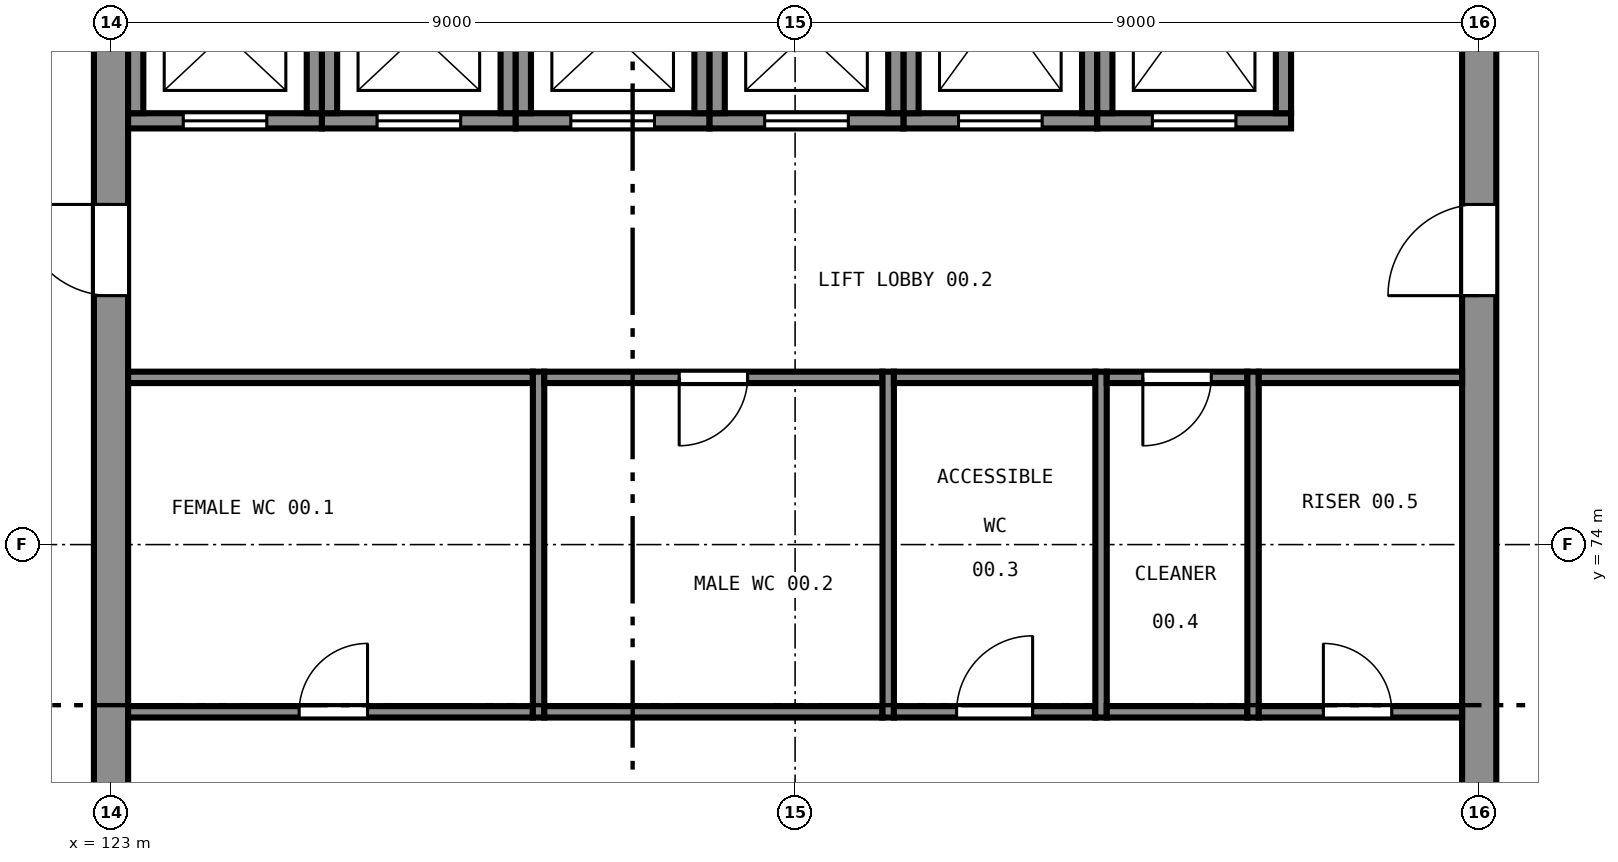
"""IFC4 building model, lengths in metres.
Left out: names, types, materials, properties, quantities, classifications, styles, units other than length and angle.
Written with IfcOpenShell. Run it as: python <this file> out.ifc"""

import sys

from ifc_helpers import new_model, si_unit, direction, frame, frame_2d, origin, place, context, subcontext, project, spatial, rectangle, extrude, element, fill, save


model = new_model("IFC4")
c1 = context("Model", 3, precision=1e-05, world=origin(), true_north=direction((0.0, 1.0)))
c2 = subcontext(c1, "Body", "Model", "MODEL_VIEW")
j1 = project(units=[si_unit("LENGTHUNIT", "METRE"), si_unit("PLANEANGLEUNIT", "RADIAN")], contexts=[c1])
p1 = place(None, origin())
s1 = spatial("IfcSite", under=j1, at=p1, CompositionType="ELEMENT")
p2 = place(p1, origin())
s2 = spatial("IfcBuilding", under=s1, at=p2, CompositionType="ELEMENT")
p3 = place(p2, origin())
s3 = spatial("IfcBuildingStorey", under=s2, at=p3, CompositionType="ELEMENT", Elevation=0.0)
p4 = place(p3, frame((141.0, 65.225, 0.0), z_axis=(0.0, 0.0, 1.0), x_axis=(0.0, 1.0, 0.0)))
e1 = element("IfcWall", 1, at=p4, inside=s3, PredefinedType="SHEAR", context=c2, shape_type="SweptSolid", body=[
    extrude(rectangle(XDim=17.55, YDim=0.45, at=frame_2d((8.775, 0.0))), origin(), (0.0, 0.0, 1.0), 5.5),
])
p5 = place(p4, frame((4.3, 0.0, 0.0)))
e2 = element("IfcOpeningElement", 2, at=p5, cuts=e1, PredefinedType="OPENING", context=c2, shape_type="SweptSolid", body=[
    extrude(rectangle(XDim=1.2, YDim=2.1, at=frame_2d((0.6, 1.05))), frame((0.0, 0.235, 0.0), z_axis=(0.0, -1.0, 0.0), x_axis=(1.0, 0.0, 0.0)), (0.0, 0.0, 1.0), 0.47),
])
p6 = place(p4, frame((12.05, 0.0, 0.0)))
e3 = element("IfcOpeningElement", 3, at=p6, cuts=e1, PredefinedType="OPENING", context=c2, shape_type="SweptSolid", body=[
    extrude(rectangle(XDim=1.2, YDim=2.1, at=frame_2d((0.6, 1.05))), frame((0.0, 0.235, 0.0), z_axis=(0.0, -1.0, 0.0), x_axis=(1.0, 0.0, 0.0)), (0.0, 0.0, 1.0), 0.47),
])
p7 = place(p3, frame((123.0, 82.775, 0.0), z_axis=(0.0, 0.0, 1.0), x_axis=(0.0, -1.0, 0.0)))
e4 = element("IfcWall", 4, at=p7, inside=s3, PredefinedType="SHEAR", context=c2, shape_type="SweptSolid", body=[
    extrude(rectangle(XDim=17.55, YDim=0.45, at=frame_2d((8.775, 0.0))), origin(), (0.0, 0.0, 1.0), 5.5),
])
p8 = place(p7, frame((12.05, 0.0, 0.0)))
e5 = element("IfcOpeningElement", 5, at=p8, cuts=e4, PredefinedType="OPENING", context=c2, shape_type="SweptSolid", body=[
    extrude(rectangle(XDim=1.2, YDim=2.1, at=frame_2d((0.6, 1.05))), frame((0.0, 0.235, 0.0), z_axis=(0.0, -1.0, 0.0), x_axis=(1.0, 0.0, 0.0)), (0.0, 0.0, 1.0), 0.47),
])
p9 = place(p7, frame((4.3, 0.0, 0.0)))
e6 = element("IfcOpeningElement", 6, at=p9, cuts=e4, PredefinedType="OPENING", context=c2, shape_type="SweptSolid", body=[
    extrude(rectangle(XDim=1.2, YDim=2.1, at=frame_2d((0.6, 1.05))), frame((0.0, 0.235, 0.0), z_axis=(0.0, -1.0, 0.0), x_axis=(1.0, 0.0, 0.0)), (0.0, 0.0, 1.0), 0.47),
])
p10 = place(p3, frame((123.225, 79.575, 0.0), z_axis=(0.0, 0.0, 1.0), x_axis=(1.0, 0.0, 0.0)))
e7 = element("IfcWall", 7, at=p10, inside=s3, PredefinedType="SHEAR", context=c2, shape_type="SweptSolid", body=[
    extrude(rectangle(XDim=2.55, YDim=0.2, at=frame_2d((1.275, 0.0))), origin(), (0.0, 0.0, 1.0), 5.5),
])
p11 = place(p10, frame((0.725, 0.0, 0.0)))
e8 = element("IfcOpeningElement", 8, at=p11, cuts=e7, PredefinedType="OPENING", context=c2, shape_type="SweptSolid", body=[
    extrude(rectangle(XDim=1.1, YDim=2.1, at=frame_2d((0.55, 1.05))), frame((0.0, 0.11, 0.0), z_axis=(0.0, -1.0, 0.0), x_axis=(1.0, 0.0, 0.0)), (0.0, 0.0, 1.0), 0.22),
])
for number, where, z_axis, x_axis in (
    (9, (125.675, 79.675, 0.0), (0.0, 0.0, 1.0), (0.0, 1.0, 0.0)),
    (10, (123.325, 81.775, 0.0), (0.0, 0.0, 1.0), (0.0, -1.0, 0.0)),
):
    element("IfcWall", number, at=place(p3, frame(where, z_axis=z_axis, x_axis=x_axis)), inside=s3, PredefinedType="SHEAR", context=c2, shape_type="SweptSolid", body=[
        extrude(rectangle(XDim=2.1, YDim=0.2, at=frame_2d((1.05, 0.0))), origin(), (0.0, 0.0, 1.0), 5.5),
    ])
p12 = place(p3, frame((125.775, 79.575, 0.0), z_axis=(0.0, 0.0, 1.0), x_axis=(1.0, 0.0, 0.0)))
e11 = element("IfcWall", 11, at=p12, inside=s3, PredefinedType="SHEAR", context=c2, shape_type="SweptSolid", body=[
    extrude(rectangle(XDim=2.55, YDim=0.2, at=frame_2d((1.275, 0.0))), origin(), (0.0, 0.0, 1.0), 5.5),
])
p13 = place(p12, frame((0.725, 0.0, 0.0)))
e12 = element("IfcOpeningElement", 12, at=p13, cuts=e11, PredefinedType="OPENING", context=c2, shape_type="SweptSolid", body=[
    extrude(rectangle(XDim=1.1, YDim=2.1, at=frame_2d((0.55, 1.05))), frame((0.0, 0.11, 0.0), z_axis=(0.0, -1.0, 0.0), x_axis=(1.0, 0.0, 0.0)), (0.0, 0.0, 1.0), 0.22),
])
for number, where, z_axis, x_axis in (
    (13, (128.225, 79.675, 0.0), (0.0, 0.0, 1.0), (0.0, 1.0, 0.0)),
    (14, (125.875, 81.775, 0.0), (0.0, 0.0, 1.0), (0.0, -1.0, 0.0)),
):
    element("IfcWall", number, at=place(p3, frame(where, z_axis=z_axis, x_axis=x_axis)), inside=s3, PredefinedType="SHEAR", context=c2, shape_type="SweptSolid", body=[
        extrude(rectangle(XDim=2.1, YDim=0.2, at=frame_2d((1.05, 0.0))), origin(), (0.0, 0.0, 1.0), 5.5),
    ])
p14 = place(p3, frame((128.325, 79.575, 0.0), z_axis=(0.0, 0.0, 1.0), x_axis=(1.0, 0.0, 0.0)))
e15 = element("IfcWall", 15, at=p14, inside=s3, PredefinedType="SHEAR", context=c2, shape_type="SweptSolid", body=[
    extrude(rectangle(XDim=2.55, YDim=0.2, at=frame_2d((1.275, 0.0))), origin(), (0.0, 0.0, 1.0), 5.5),
])
p15 = place(p14, frame((0.725, 0.0, 0.0)))
e16 = element("IfcOpeningElement", 16, at=p15, cuts=e15, PredefinedType="OPENING", context=c2, shape_type="SweptSolid", body=[
    extrude(rectangle(XDim=1.1, YDim=2.1, at=frame_2d((0.55, 1.05))), frame((0.0, 0.11, 0.0), z_axis=(0.0, -1.0, 0.0), x_axis=(1.0, 0.0, 0.0)), (0.0, 0.0, 1.0), 0.22),
])
for number, where, z_axis, x_axis in (
    (17, (130.775, 79.675, 0.0), (0.0, 0.0, 1.0), (0.0, 1.0, 0.0)),
    (18, (128.425, 81.775, 0.0), (0.0, 0.0, 1.0), (0.0, -1.0, 0.0)),
):
    element("IfcWall", number, at=place(p3, frame(where, z_axis=z_axis, x_axis=x_axis)), inside=s3, PredefinedType="SHEAR", context=c2, shape_type="SweptSolid", body=[
        extrude(rectangle(XDim=2.1, YDim=0.2, at=frame_2d((1.05, 0.0))), origin(), (0.0, 0.0, 1.0), 5.5),
    ])
p16 = place(p3, frame((130.875, 79.575, 0.0), z_axis=(0.0, 0.0, 1.0), x_axis=(1.0, 0.0, 0.0)))
e19 = element("IfcWall", 19, at=p16, inside=s3, PredefinedType="SHEAR", context=c2, shape_type="SweptSolid", body=[
    extrude(rectangle(XDim=2.55, YDim=0.2, at=frame_2d((1.275, 0.0))), origin(), (0.0, 0.0, 1.0), 5.5),
])
p17 = place(p16, frame((0.725, 0.0, 0.0)))
e20 = element("IfcOpeningElement", 20, at=p17, cuts=e19, PredefinedType="OPENING", context=c2, shape_type="SweptSolid", body=[
    extrude(rectangle(XDim=1.1, YDim=2.1, at=frame_2d((0.55, 1.05))), frame((0.0, 0.11, 0.0), z_axis=(0.0, -1.0, 0.0), x_axis=(1.0, 0.0, 0.0)), (0.0, 0.0, 1.0), 0.22),
])
for number, where, z_axis, x_axis in (
    (21, (133.325, 79.675, 0.0), (0.0, 0.0, 1.0), (0.0, 1.0, 0.0)),
    (22, (130.975, 81.775, 0.0), (0.0, 0.0, 1.0), (0.0, -1.0, 0.0)),
):
    element("IfcWall", number, at=place(p3, frame(where, z_axis=z_axis, x_axis=x_axis)), inside=s3, PredefinedType="SHEAR", context=c2, shape_type="SweptSolid", body=[
        extrude(rectangle(XDim=2.1, YDim=0.2, at=frame_2d((1.05, 0.0))), origin(), (0.0, 0.0, 1.0), 5.5),
    ])
p18 = place(p3, frame((133.425, 79.575, 0.0), z_axis=(0.0, 0.0, 1.0), x_axis=(1.0, 0.0, 0.0)))
e23 = element("IfcWall", 23, at=p18, inside=s3, PredefinedType="SHEAR", context=c2, shape_type="SweptSolid", body=[
    extrude(rectangle(XDim=2.55, YDim=0.2, at=frame_2d((1.275, 0.0))), origin(), (0.0, 0.0, 1.0), 5.5),
])
p19 = place(p18, frame((0.725, 0.0, 0.0)))
e24 = element("IfcOpeningElement", 24, at=p19, cuts=e23, PredefinedType="OPENING", context=c2, shape_type="SweptSolid", body=[
    extrude(rectangle(XDim=1.1, YDim=2.1, at=frame_2d((0.55, 1.05))), frame((0.0, 0.11, 0.0), z_axis=(0.0, -1.0, 0.0), x_axis=(1.0, 0.0, 0.0)), (0.0, 0.0, 1.0), 0.22),
])
for number, where, z_axis, x_axis in (
    (25, (135.875, 79.675, 0.0), (0.0, 0.0, 1.0), (0.0, 1.0, 0.0)),
    (26, (133.525, 82.475, 0.0), (0.0, 0.0, 1.0), (0.0, -1.0, 0.0)),
):
    element("IfcWall", number, at=place(p3, frame(where, z_axis=z_axis, x_axis=x_axis)), inside=s3, PredefinedType="SHEAR", context=c2, shape_type="SweptSolid", body=[
        extrude(rectangle(XDim=2.8, YDim=0.2, at=frame_2d((1.4, 0.0))), origin(), (0.0, 0.0, 1.0), 5.5),
    ])
p20 = place(p3, frame((135.975, 79.575, 0.0), z_axis=(0.0, 0.0, 1.0), x_axis=(1.0, 0.0, 0.0)))
e27 = element("IfcWall", 27, at=p20, inside=s3, PredefinedType="SHEAR", context=c2, shape_type="SweptSolid", body=[
    extrude(rectangle(XDim=2.55, YDim=0.2, at=frame_2d((1.275, 0.0))), origin(), (0.0, 0.0, 1.0), 5.5),
])
p21 = place(p20, frame((0.725, 0.0, 0.0)))
e28 = element("IfcOpeningElement", 28, at=p21, cuts=e27, PredefinedType="OPENING", context=c2, shape_type="SweptSolid", body=[
    extrude(rectangle(XDim=1.1, YDim=2.1, at=frame_2d((0.55, 1.05))), frame((0.0, 0.11, 0.0), z_axis=(0.0, -1.0, 0.0), x_axis=(1.0, 0.0, 0.0)), (0.0, 0.0, 1.0), 0.22),
])
for number, where, z_axis, x_axis in (
    (29, (138.425, 79.675, 0.0), (0.0, 0.0, 1.0), (0.0, 1.0, 0.0)),
    (30, (136.075, 82.475, 0.0), (0.0, 0.0, 1.0), (0.0, -1.0, 0.0)),
):
    element("IfcWall", number, at=place(p3, frame(where, z_axis=z_axis, x_axis=x_axis)), inside=s3, PredefinedType="SHEAR", context=c2, shape_type="SweptSolid", body=[
        extrude(rectangle(XDim=2.8, YDim=0.2, at=frame_2d((1.4, 0.0))), origin(), (0.0, 0.0, 1.0), 5.5),
    ])
p22 = place(p3, frame((128.625, 71.725, 0.0), z_axis=(0.0, 0.0, 1.0), x_axis=(0.0, 1.0, 0.0)))
e31 = element("IfcWall", 31, at=p22, inside=s3, PredefinedType="PARTITIONING", context=c2, shape_type="SweptSolid", body=[
    extrude(rectangle(XDim=4.55, YDim=0.15, at=frame_2d((2.275, 0.0))), origin(), (0.0, 0.0, 1.0), 5.25),
])
p23 = place(p3, frame((123.225, 71.8, 0.0), z_axis=(0.0, 0.0, 1.0), x_axis=(1.0, 0.0, 0.0)))
e32 = element("IfcWall", 32, at=p23, inside=s3, PredefinedType="PARTITIONING", context=c2, shape_type="SweptSolid", body=[
    extrude(rectangle(XDim=5.325, YDim=0.15, at=frame_2d((2.663, 0.0))), origin(), (0.0, 0.0, 1.0), 5.25),
])
p24 = place(p23, frame((2.25, 0.0, 0.0)))
e33 = element("IfcOpeningElement", 33, at=p24, cuts=e32, PredefinedType="OPENING", context=c2, shape_type="SweptSolid", body=[
    extrude(rectangle(XDim=0.9, YDim=2.1, at=frame_2d((0.45, 1.05))), frame((0.0, 0.085, 0.0), z_axis=(0.0, -1.0, 0.0), x_axis=(1.0, 0.0, 0.0)), (0.0, 0.0, 1.0), 0.17),
])
p25 = place(p3, frame((123.225, 76.2, 0.0), z_axis=(0.0, 0.0, 1.0), x_axis=(1.0, 0.0, 0.0)))
e34 = element("IfcWall", 34, at=p25, inside=s3, PredefinedType="PARTITIONING", context=c2, shape_type="SweptSolid", body=[
    extrude(rectangle(XDim=5.325, YDim=0.15, at=frame_2d((2.663, 0.0))), origin(), (0.0, 0.0, 1.0), 5.25),
])
p26 = place(p3, frame((133.225, 71.725, 0.0), z_axis=(0.0, 0.0, 1.0), x_axis=(0.0, 1.0, 0.0)))
e35 = element("IfcWall", 35, at=p26, inside=s3, PredefinedType="PARTITIONING", context=c2, shape_type="SweptSolid", body=[
    extrude(rectangle(XDim=4.55, YDim=0.15, at=frame_2d((2.275, 0.0))), origin(), (0.0, 0.0, 1.0), 5.25),
])
p27 = place(p3, frame((128.7, 71.8, 0.0), z_axis=(0.0, 0.0, 1.0), x_axis=(1.0, 0.0, 0.0)))
e36 = element("IfcWall", 36, at=p27, inside=s3, PredefinedType="PARTITIONING", context=c2, shape_type="SweptSolid", body=[
    extrude(rectangle(XDim=4.45, YDim=0.15, at=frame_2d((2.225, 0.0))), origin(), (0.0, 0.0, 1.0), 5.25),
])
p28 = place(p3, frame((128.7, 76.2, 0.0), z_axis=(0.0, 0.0, 1.0), x_axis=(1.0, 0.0, 0.0)))
e37 = element("IfcWall", 37, at=p28, inside=s3, PredefinedType="PARTITIONING", context=c2, shape_type="SweptSolid", body=[
    extrude(rectangle(XDim=4.45, YDim=0.15, at=frame_2d((2.225, 0.0))), origin(), (0.0, 0.0, 1.0), 5.25),
])
p29 = place(p28, frame((1.775, 0.0, 0.0)))
e38 = element("IfcOpeningElement", 38, at=p29, cuts=e37, PredefinedType="OPENING", context=c2, shape_type="SweptSolid", body=[
    extrude(rectangle(XDim=0.9, YDim=2.1, at=frame_2d((0.45, 1.05))), frame((0.0, 0.085, 0.0), z_axis=(0.0, -1.0, 0.0), x_axis=(1.0, 0.0, 0.0)), (0.0, 0.0, 1.0), 0.17),
])
p30 = place(p3, frame((136.025, 71.725, 0.0), z_axis=(0.0, 0.0, 1.0), x_axis=(0.0, 1.0, 0.0)))
e39 = element("IfcWall", 39, at=p30, inside=s3, PredefinedType="PARTITIONING", context=c2, shape_type="SweptSolid", body=[
    extrude(rectangle(XDim=4.55, YDim=0.15, at=frame_2d((2.275, 0.0))), origin(), (0.0, 0.0, 1.0), 5.25),
])
p31 = place(p3, frame((133.3, 71.8, 0.0), z_axis=(0.0, 0.0, 1.0), x_axis=(1.0, 0.0, 0.0)))
e40 = element("IfcWall", 40, at=p31, inside=s3, PredefinedType="PARTITIONING", context=c2, shape_type="SweptSolid", body=[
    extrude(rectangle(XDim=2.65, YDim=0.15, at=frame_2d((1.325, 0.0))), origin(), (0.0, 0.0, 1.0), 5.25),
])
p32 = place(p31, frame((0.825, 0.0, 0.0)))
e41 = element("IfcOpeningElement", 41, at=p32, cuts=e40, PredefinedType="OPENING", context=c2, shape_type="SweptSolid", body=[
    extrude(rectangle(XDim=1.0, YDim=2.1, at=frame_2d((0.5, 1.05))), frame((0.0, 0.085, 0.0), z_axis=(0.0, -1.0, 0.0), x_axis=(1.0, 0.0, 0.0)), (0.0, 0.0, 1.0), 0.17),
])
p33 = place(p3, frame((133.3, 76.2, 0.0), z_axis=(0.0, 0.0, 1.0), x_axis=(1.0, 0.0, 0.0)))
e42 = element("IfcWall", 42, at=p33, inside=s3, PredefinedType="PARTITIONING", context=c2, shape_type="SweptSolid", body=[
    extrude(rectangle(XDim=2.65, YDim=0.15, at=frame_2d((1.325, 0.0))), origin(), (0.0, 0.0, 1.0), 5.25),
])
p34 = place(p3, frame((138.025, 71.725, 0.0), z_axis=(0.0, 0.0, 1.0), x_axis=(0.0, 1.0, 0.0)))
e43 = element("IfcWall", 43, at=p34, inside=s3, PredefinedType="PARTITIONING", context=c2, shape_type="SweptSolid", body=[
    extrude(rectangle(XDim=4.55, YDim=0.15, at=frame_2d((2.275, 0.0))), origin(), (0.0, 0.0, 1.0), 5.25),
])
p35 = place(p3, frame((136.1, 71.8, 0.0), z_axis=(0.0, 0.0, 1.0), x_axis=(1.0, 0.0, 0.0)))
e44 = element("IfcWall", 44, at=p35, inside=s3, PredefinedType="PARTITIONING", context=c2, shape_type="SweptSolid", body=[
    extrude(rectangle(XDim=1.85, YDim=0.15, at=frame_2d((0.925, 0.0))), origin(), (0.0, 0.0, 1.0), 5.25),
])
p36 = place(p3, frame((136.1, 76.2, 0.0), z_axis=(0.0, 0.0, 1.0), x_axis=(1.0, 0.0, 0.0)))
e45 = element("IfcWall", 45, at=p36, inside=s3, PredefinedType="PARTITIONING", context=c2, shape_type="SweptSolid", body=[
    extrude(rectangle(XDim=1.85, YDim=0.15, at=frame_2d((0.925, 0.0))), origin(), (0.0, 0.0, 1.0), 5.25),
])
p37 = place(p36, frame((0.475, 0.0, 0.0)))
e46 = element("IfcOpeningElement", 46, at=p37, cuts=e45, PredefinedType="OPENING", context=c2, shape_type="SweptSolid", body=[
    extrude(rectangle(XDim=0.9, YDim=2.1, at=frame_2d((0.45, 1.05))), frame((0.0, 0.085, 0.0), z_axis=(0.0, -1.0, 0.0), x_axis=(1.0, 0.0, 0.0)), (0.0, 0.0, 1.0), 0.17),
])
p38 = place(p3, frame((138.1, 71.8, 0.0), z_axis=(0.0, 0.0, 1.0), x_axis=(1.0, 0.0, 0.0)))
e47 = element("IfcWall", 47, at=p38, inside=s3, PredefinedType="PARTITIONING", context=c2, shape_type="SweptSolid", body=[
    extrude(rectangle(XDim=2.675, YDim=0.15, at=frame_2d((1.337, 0.0))), origin(), (0.0, 0.0, 1.0), 5.25),
])
p39 = place(p38, frame((0.85, 0.0, 0.0)))
e48 = element("IfcOpeningElement", 48, at=p39, cuts=e47, PredefinedType="OPENING", context=c2, shape_type="SweptSolid", body=[
    extrude(rectangle(XDim=0.9, YDim=2.1, at=frame_2d((0.45, 1.05))), frame((0.0, 0.085, 0.0), z_axis=(0.0, -1.0, 0.0), x_axis=(1.0, 0.0, 0.0)), (0.0, 0.0, 1.0), 0.17),
])
p40 = place(p3, frame((138.1, 76.2, 0.0), z_axis=(0.0, 0.0, 1.0), x_axis=(1.0, 0.0, 0.0)))
e49 = element("IfcWall", 49, at=p40, inside=s3, PredefinedType="PARTITIONING", context=c2, shape_type="SweptSolid", body=[
    extrude(rectangle(XDim=2.675, YDim=0.15, at=frame_2d((1.337, 0.0))), origin(), (0.0, 0.0, 1.0), 5.25),
])
p41 = place(p11, origin())
e50 = element("IfcDoor", 50, at=p41, inside=s3, OperationType="SLIDING_TO_LEFT", PredefinedType="DOOR", context=c2, shape_type="SweptSolid", body=[
    extrude(rectangle(XDim=1.1, YDim=2.1, at=frame_2d((0.55, 1.05))), frame((0.0, 0.025, 0.0), z_axis=(0.0, -1.0, 0.0), x_axis=(1.0, 0.0, 0.0)), (0.0, 0.0, 1.0), 0.05),
])
fill(e8, e50)
p42 = place(p13, origin())
e51 = element("IfcDoor", 51, at=p42, inside=s3, OperationType="SLIDING_TO_LEFT", PredefinedType="DOOR", context=c2, shape_type="SweptSolid", body=[
    extrude(rectangle(XDim=1.1, YDim=2.1, at=frame_2d((0.55, 1.05))), frame((0.0, 0.025, 0.0), z_axis=(0.0, -1.0, 0.0), x_axis=(1.0, 0.0, 0.0)), (0.0, 0.0, 1.0), 0.05),
])
fill(e12, e51)
p43 = place(p15, origin())
e52 = element("IfcDoor", 52, at=p43, inside=s3, OperationType="SLIDING_TO_LEFT", PredefinedType="DOOR", context=c2, shape_type="SweptSolid", body=[
    extrude(rectangle(XDim=1.1, YDim=2.1, at=frame_2d((0.55, 1.05))), frame((0.0, 0.025, 0.0), z_axis=(0.0, -1.0, 0.0), x_axis=(1.0, 0.0, 0.0)), (0.0, 0.0, 1.0), 0.05),
])
fill(e16, e52)
p44 = place(p17, origin())
e53 = element("IfcDoor", 53, at=p44, inside=s3, OperationType="SLIDING_TO_LEFT", PredefinedType="DOOR", context=c2, shape_type="SweptSolid", body=[
    extrude(rectangle(XDim=1.1, YDim=2.1, at=frame_2d((0.55, 1.05))), frame((0.0, 0.025, 0.0), z_axis=(0.0, -1.0, 0.0), x_axis=(1.0, 0.0, 0.0)), (0.0, 0.0, 1.0), 0.05),
])
fill(e20, e53)
p45 = place(p19, origin())
e54 = element("IfcDoor", 54, at=p45, inside=s3, OperationType="SLIDING_TO_LEFT", PredefinedType="DOOR", context=c2, shape_type="SweptSolid", body=[
    extrude(rectangle(XDim=1.1, YDim=2.1, at=frame_2d((0.55, 1.05))), frame((0.0, 0.025, 0.0), z_axis=(0.0, -1.0, 0.0), x_axis=(1.0, 0.0, 0.0)), (0.0, 0.0, 1.0), 0.05),
])
fill(e24, e54)
p46 = place(p21, origin())
e55 = element("IfcDoor", 55, at=p46, inside=s3, OperationType="SLIDING_TO_LEFT", PredefinedType="DOOR", context=c2, shape_type="SweptSolid", body=[
    extrude(rectangle(XDim=1.1, YDim=2.1, at=frame_2d((0.55, 1.05))), frame((0.0, 0.025, 0.0), z_axis=(0.0, -1.0, 0.0), x_axis=(1.0, 0.0, 0.0)), (0.0, 0.0, 1.0), 0.05),
])
fill(e28, e55)
p47 = place(p9, frame((1.2, 0.0, 0.0), z_axis=(0.0, 0.0, 1.0), x_axis=(-1.0, 0.0, 0.0)))
e56 = element("IfcDoor", 56, at=p47, inside=s3, OperationType="SINGLE_SWING_LEFT", PredefinedType="DOOR", context=c2, shape_type="SweptSolid", body=[
    extrude(rectangle(XDim=1.2, YDim=2.1, at=frame_2d((0.6, 1.05))), frame((0.0, 0.025, 0.0), z_axis=(0.0, -1.0, 0.0), x_axis=(1.0, 0.0, 0.0)), (0.0, 0.0, 1.0), 0.05),
])
fill(e6, e56)
p48 = place(p6, origin())
e57 = element("IfcDoor", 57, at=p48, inside=s3, OperationType="SINGLE_SWING_RIGHT", PredefinedType="DOOR", context=c2, shape_type="SweptSolid", body=[
    extrude(rectangle(XDim=1.2, YDim=2.1, at=frame_2d((0.6, 1.05))), frame((0.0, 0.025, 0.0), z_axis=(0.0, -1.0, 0.0), x_axis=(1.0, 0.0, 0.0)), (0.0, 0.0, 1.0), 0.05),
])
fill(e3, e57)
p49 = place(p24, origin())
e58 = element("IfcDoor", 58, at=p49, inside=s3, OperationType="SINGLE_SWING_LEFT", PredefinedType="DOOR", context=c2, shape_type="SweptSolid", body=[
    extrude(rectangle(XDim=0.9, YDim=2.1, at=frame_2d((0.45, 1.05))), frame((0.0, 0.025, 0.0), z_axis=(0.0, -1.0, 0.0), x_axis=(1.0, 0.0, 0.0)), (0.0, 0.0, 1.0), 0.05),
])
fill(e33, e58)
p50 = place(p29, frame((0.9, 0.0, 0.0), z_axis=(0.0, 0.0, 1.0), x_axis=(-1.0, 0.0, 0.0)))
e59 = element("IfcDoor", 59, at=p50, inside=s3, OperationType="SINGLE_SWING_LEFT", PredefinedType="DOOR", context=c2, shape_type="SweptSolid", body=[
    extrude(rectangle(XDim=0.9, YDim=2.1, at=frame_2d((0.45, 1.05))), frame((0.0, 0.025, 0.0), z_axis=(0.0, -1.0, 0.0), x_axis=(1.0, 0.0, 0.0)), (0.0, 0.0, 1.0), 0.05),
])
fill(e38, e59)
p51 = place(p32, origin())
e60 = element("IfcDoor", 60, at=p51, inside=s3, OperationType="SINGLE_SWING_LEFT", PredefinedType="DOOR", context=c2, shape_type="SweptSolid", body=[
    extrude(rectangle(XDim=1.0, YDim=2.1, at=frame_2d((0.5, 1.05))), frame((0.0, 0.025, 0.0), z_axis=(0.0, -1.0, 0.0), x_axis=(1.0, 0.0, 0.0)), (0.0, 0.0, 1.0), 0.05),
])
fill(e41, e60)
p52 = place(p37, frame((0.9, 0.0, 0.0), z_axis=(0.0, 0.0, 1.0), x_axis=(-1.0, 0.0, 0.0)))
e61 = element("IfcDoor", 61, at=p52, inside=s3, OperationType="SINGLE_SWING_LEFT", PredefinedType="DOOR", context=c2, shape_type="SweptSolid", body=[
    extrude(rectangle(XDim=0.9, YDim=2.1, at=frame_2d((0.45, 1.05))), frame((0.0, 0.025, 0.0), z_axis=(0.0, -1.0, 0.0), x_axis=(1.0, 0.0, 0.0)), (0.0, 0.0, 1.0), 0.05),
])
fill(e46, e61)
p53 = place(p39, origin())
e62 = element("IfcDoor", 62, at=p53, inside=s3, OperationType="SINGLE_SWING_RIGHT", PredefinedType="DOOR", context=c2, shape_type="SweptSolid", body=[
    extrude(rectangle(XDim=0.9, YDim=2.1, at=frame_2d((0.45, 1.05))), frame((0.0, 0.025, 0.0), z_axis=(0.0, -1.0, 0.0), x_axis=(1.0, 0.0, 0.0)), (0.0, 0.0, 1.0), 0.05),
])
fill(e48, e62)
save(model, sys.argv[1])
